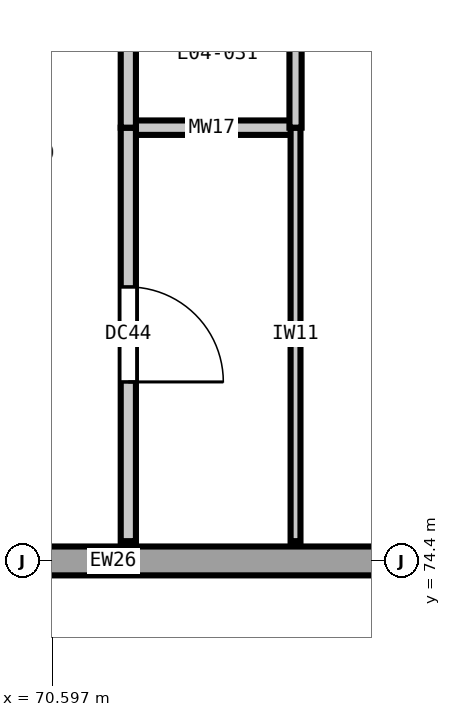
"""IFC4 building model, lengths in metres.
Left out: names, types, materials, properties, quantities, classifications, styles, units other than length and angle.
Written with IfcOpenShell. Run it as: python <this file> out.ifc"""

import sys

from ifc_helpers import new_model, si_unit, direction, frame, frame_2d, origin, place, context, subcontext, project, spatial, rectangle, extrude, element, fill, save


model = new_model("IFC4")
c1 = context("Model", 3, precision=1e-05, world=origin(), true_north=direction((0.0, 1.0)))
c2 = subcontext(c1, "Body", "Model", "MODEL_VIEW")
j1 = project(units=[si_unit("LENGTHUNIT", "METRE"), si_unit("PLANEANGLEUNIT", "RADIAN")], contexts=[c1])
p1 = place(None, origin())
s1 = spatial("IfcSite", under=j1, at=p1, CompositionType="ELEMENT")
p2 = place(p1, origin())
s2 = spatial("IfcBuilding", under=s1, at=p2, CompositionType="ELEMENT")
p3 = place(p2, frame((0.0, 0.0, 20.4)))
s3 = spatial("IfcBuildingStorey", under=s2, at=p3, CompositionType="ELEMENT", Elevation=20.4)
p4 = place(p3, frame((75.327, 74.4, 0.0), z_axis=(0.0, 0.0, 1.0), x_axis=(-1.0, 0.0, 0.0)))
e1 = element("IfcWall", 1, at=p4, inside=s3, PredefinedType="SOLIDWALL", context=c2, shape_type="SweptSolid", body=[
    extrude(rectangle(XDim=7.854, YDim=0.38, at=frame_2d((3.927, 0.0))), origin(), (0.0, 0.0, 1.0), 3.48),
])
p5 = place(p3, frame((71.6, 80.1, 0.0), z_axis=(0.0, 0.0, 1.0), x_axis=(1.0, 0.0, 0.0)))
e2 = element("IfcWall", 2, at=p5, inside=s3, PredefinedType="PLUMBINGWALL", context=c2, shape_type="SweptSolid", body=[
    extrude(rectangle(XDim=2.2, YDim=0.19, at=frame_2d((1.1, 0.0))), origin(), (0.0, 0.0, 1.0), 3.82),
])
p6 = place(p3, frame((71.6, 74.66, 0.0), z_axis=(0.0, 0.0, 1.0), x_axis=(0.0, 1.0, 0.0)))
e3 = element("IfcWall", 3, at=p6, inside=s3, PredefinedType="PARTITIONING", context=c2, shape_type="SweptSolid", body=[
    extrude(rectangle(XDim=5.44, YDim=0.2, at=frame_2d((2.72, 0.0))), origin(), (0.0, 0.0, 1.0), 3.82),
])
p7 = place(p6, frame((2.095, 0.0, 0.0)))
e4 = element("IfcOpeningElement", 4, at=p7, cuts=e3, PredefinedType="OPENING", context=c2, shape_type="SweptSolid", body=[
    extrude(rectangle(XDim=1.25, YDim=2.15, at=frame_2d((0.625, 1.075))), frame((0.0, 0.11, 0.0), z_axis=(0.0, -1.0, 0.0), x_axis=(1.0, 0.0, 0.0)), (0.0, 0.0, 1.0), 0.22),
])
p8 = place(p3, frame((71.6, 80.1, 0.0), z_axis=(0.0, 0.0, 1.0), x_axis=(0.0, 1.0, 0.0)))
e5 = element("IfcWall", 5, at=p8, inside=s3, PredefinedType="PARTITIONING", context=c2, shape_type="SweptSolid", body=[
    extrude(rectangle(XDim=5.7, YDim=0.2, at=frame_2d((2.85, 0.0))), origin(), (0.0, 0.0, 1.0), 3.82),
])
p9 = place(p8, frame((2.39, 0.0, 0.0)))
e6 = element("IfcOpeningElement", 6, at=p9, cuts=e5, PredefinedType="OPENING", context=c2, shape_type="SweptSolid", body=[
    extrude(rectangle(XDim=0.92, YDim=2.1, at=frame_2d((0.46, 1.05))), frame((0.0, 0.11, 0.0), z_axis=(0.0, -1.0, 0.0), x_axis=(1.0, 0.0, 0.0)), (0.0, 0.0, 1.0), 0.22),
])
p10 = place(p3, frame((73.8, 74.66, 0.0), z_axis=(0.0, 0.0, 1.0), x_axis=(0.0, 1.0, 0.0)))
e7 = element("IfcWall", 7, at=p10, inside=s3, PredefinedType="PARTITIONING", context=c2, shape_type="SweptSolid", body=[
    extrude(rectangle(XDim=5.44, YDim=0.13, at=frame_2d((2.72, 0.0))), origin(), (0.0, 0.0, 1.0), 3.82),
])
p11 = place(p3, frame((73.8, 80.1, 0.0), z_axis=(0.0, 0.0, 1.0), x_axis=(0.0, 1.0, 0.0)))
e8 = element("IfcWall", 8, at=p11, inside=s3, PredefinedType="PLUMBINGWALL", context=c2, shape_type="SweptSolid", body=[
    extrude(rectangle(XDim=5.7, YDim=0.16, at=frame_2d((2.85, 0.0))), origin(), (0.0, 0.0, 1.0), 3.82),
])
p12 = place(p7, frame((1.25, 0.0, 0.0), z_axis=(0.0, 0.0, 1.0), x_axis=(-1.0, 0.0, 0.0)))
e9 = element("IfcDoor", 9, at=p12, inside=s3, OperationType="SINGLE_SWING_RIGHT", PredefinedType="DOOR", context=c2, shape_type="SweptSolid", body=[
    extrude(rectangle(XDim=1.25, YDim=2.15, at=frame_2d((0.625, 1.075))), frame((0.0, 0.025, 0.0), z_axis=(0.0, -1.0, 0.0), x_axis=(1.0, 0.0, 0.0)), (0.0, 0.0, 1.0), 0.05),
])
fill(e4, e9)
save(model, sys.argv[1])
